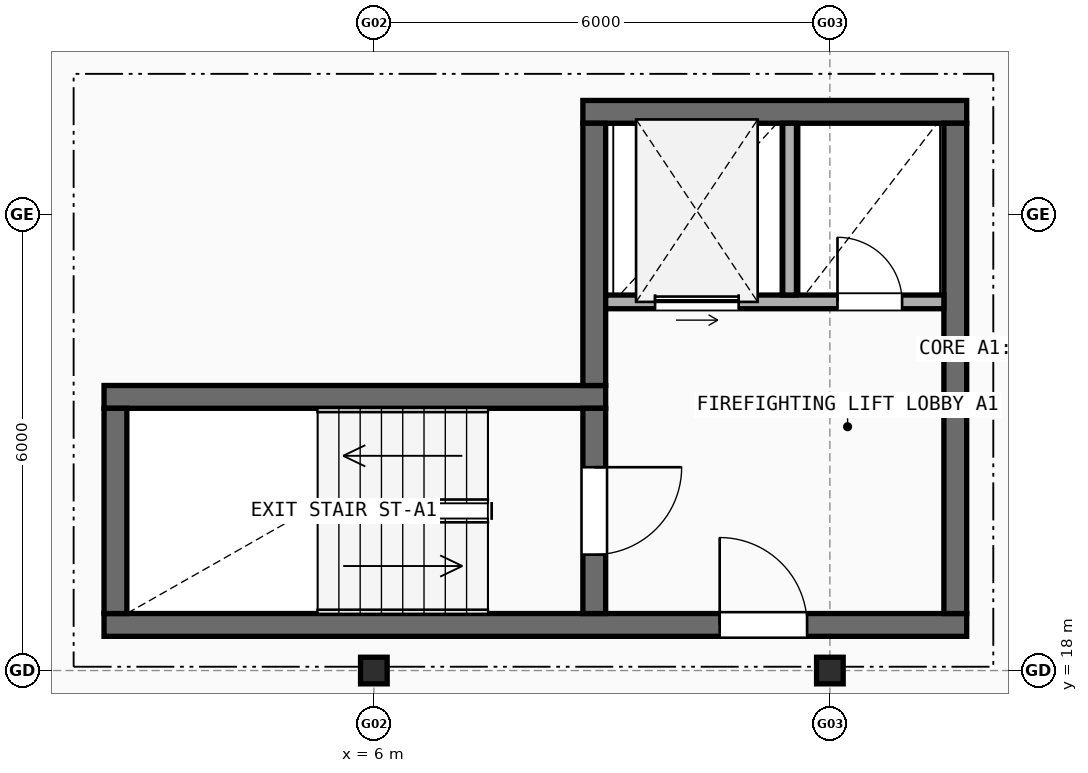
"""IFC4 building model, lengths in metres.
Left out: names, types, materials, properties, quantities, classifications, styles, units other than length and angle.
Written with IfcOpenShell. Run it as: python <this file> out.ifc"""

import sys

from ifc_helpers import new_model, si_unit, direction, frame, frame_2d, origin, origin_2d, place, context, subcontext, project, spatial, rectangle, extrude, element, fill, save


model = new_model("IFC4")
c1 = context("Model", 3, precision=1e-05, world=origin(), true_north=direction((0.0, 1.0)))
c2 = subcontext(c1, "Body", "Model", "MODEL_VIEW")
j1 = project(units=[si_unit("LENGTHUNIT", "METRE"), si_unit("PLANEANGLEUNIT", "RADIAN")], contexts=[c1])
p1 = place(None, origin())
s1 = spatial("IfcSite", under=j1, at=p1, CompositionType="ELEMENT")
p2 = place(p1, origin())
s2 = spatial("IfcBuilding", under=s1, at=p2, CompositionType="ELEMENT")
p3 = place(p2, frame((0.0, 0.0, 42.9)))
s3 = spatial("IfcBuildingStorey", under=s2, at=p3, CompositionType="ELEMENT", Elevation=42.9)
for number, where, z_axis, x_axis in (
    (1, (6.0, 18.0, 0.0), (0.0, 0.0, 1.0), (1.0, 0.0, 0.0)),
    (2, (12.0, 18.0, 0.0), (0.0, 0.0, 1.0), (1.0, 0.0, 0.0)),
):
    element("IfcColumn", number, at=place(p3, frame(where, z_axis=z_axis, x_axis=x_axis)), inside=s3, PredefinedType="COLUMN", context=c2, shape_type="SweptSolid", body=[
        extrude(rectangle(XDim=0.35, YDim=0.35, at=origin_2d()), origin(), (0.0, 0.0, 1.0), 3.005),
    ])
p4 = place(p3, frame((2.45, 18.6, 0.0), z_axis=(0.0, 0.0, 1.0), x_axis=(1.0, 0.0, 0.0)))
e3 = element("IfcWall", 3, at=p4, inside=s3, PredefinedType="SHEAR", context=c2, shape_type="SweptSolid", body=[
    extrude(rectangle(XDim=11.35, YDim=0.3, at=frame_2d((5.675, 0.0))), origin(), (0.0, 0.0, 1.0), 3.005),
])
p5 = place(p4, frame((8.1, 0.0, 0.0)))
e4 = element("IfcOpeningElement", 4, at=p5, cuts=e3, PredefinedType="OPENING", context=c2, shape_type="SweptSolid", body=[
    extrude(rectangle(XDim=1.15, YDim=2.15, at=frame_2d((0.575, 1.075))), frame((0.0, 0.16, 0.0), z_axis=(0.0, -1.0, 0.0), x_axis=(1.0, 0.0, 0.0)), (0.0, 0.0, 1.0), 0.32),
])
p6 = place(p3, frame((9.05, 21.6, 0.0), z_axis=(0.0, 0.0, 1.0), x_axis=(-1.0, 0.0, 0.0)))
e5 = element("IfcWall", 5, at=p6, inside=s3, PredefinedType="SHEAR", context=c2, shape_type="SweptSolid", body=[
    extrude(rectangle(XDim=6.6, YDim=0.3, at=frame_2d((3.3, 0.0))), origin(), (0.0, 0.0, 1.0), 3.005),
])
p7 = place(p3, frame((2.6, 21.45, 0.0), z_axis=(0.0, 0.0, 1.0), x_axis=(0.0, -1.0, 0.0)))
e6 = element("IfcWall", 6, at=p7, inside=s3, PredefinedType="SHEAR", context=c2, shape_type="SweptSolid", body=[
    extrude(rectangle(XDim=2.7, YDim=0.3, at=frame_2d((1.35, 0.0))), origin(), (0.0, 0.0, 1.0), 3.005),
])
p8 = place(p3, frame((8.9, 18.75, 0.0), z_axis=(0.0, 0.0, 1.0), x_axis=(0.0, 1.0, 0.0)))
e7 = element("IfcWall", 7, at=p8, inside=s3, PredefinedType="SHEAR", context=c2, shape_type="SweptSolid", body=[
    extrude(rectangle(XDim=2.7, YDim=0.3, at=frame_2d((1.35, 0.0))), origin(), (0.0, 0.0, 1.0), 3.005),
])
p9 = place(p8, frame((0.775, 0.0, 0.0)))
e8 = element("IfcOpeningElement", 8, at=p9, cuts=e7, PredefinedType="OPENING", context=c2, shape_type="SweptSolid", body=[
    extrude(rectangle(XDim=1.15, YDim=2.15, at=frame_2d((0.575, 1.075))), frame((0.0, 0.16, 0.0), z_axis=(0.0, -1.0, 0.0), x_axis=(1.0, 0.0, 0.0)), (0.0, 0.0, 1.0), 0.32),
])
p10 = place(p3, frame((13.8, 25.35, 0.0), z_axis=(0.0, 0.0, 1.0), x_axis=(-1.0, 0.0, 0.0)))
e9 = element("IfcWall", 9, at=p10, inside=s3, PredefinedType="SHEAR", context=c2, shape_type="SweptSolid", body=[
    extrude(rectangle(XDim=5.05, YDim=0.3, at=frame_2d((2.525, 0.0))), origin(), (0.0, 0.0, 1.0), 3.005),
])
p11 = place(p3, frame((13.65, 18.75, 0.0), z_axis=(0.0, 0.0, 1.0), x_axis=(0.0, 1.0, 0.0)))
e10 = element("IfcWall", 10, at=p11, inside=s3, PredefinedType="SHEAR", context=c2, shape_type="SweptSolid", body=[
    extrude(rectangle(XDim=6.45, YDim=0.3, at=frame_2d((3.225, 0.0))), origin(), (0.0, 0.0, 1.0), 3.005),
])
p12 = place(p3, frame((8.9, 21.75, 0.0), z_axis=(0.0, 0.0, 1.0), x_axis=(0.0, 1.0, 0.0)))
e11 = element("IfcWall", 11, at=p12, inside=s3, PredefinedType="SHEAR", context=c2, shape_type="SweptSolid", body=[
    extrude(rectangle(XDim=3.45, YDim=0.3, at=frame_2d((1.725, 0.0))), origin(), (0.0, 0.0, 1.0), 3.005),
])
p13 = place(p3, frame((9.05, 22.85, 0.0), z_axis=(0.0, 0.0, 1.0), x_axis=(1.0, 0.0, 0.0)))
e12 = element("IfcWall", 12, at=p13, inside=s3, PredefinedType="SOLIDWALL", context=c2, shape_type="SweptSolid", body=[
    extrude(rectangle(XDim=4.45, YDim=0.18, at=frame_2d((2.225, 0.0))), origin(), (0.0, 0.0, 1.0), 3.005),
])
p14 = place(p13, frame((0.65, 0.0, 0.0)))
e13 = element("IfcOpeningElement", 13, at=p14, cuts=e12, PredefinedType="OPENING", context=c2, shape_type="SweptSolid", body=[
    extrude(rectangle(XDim=1.1, YDim=2.15, at=frame_2d((0.55, 1.075))), frame((0.0, 0.1, 0.0), z_axis=(0.0, -1.0, 0.0), x_axis=(1.0, 0.0, 0.0)), (0.0, 0.0, 1.0), 0.2),
])
p15 = place(p13, frame((3.05, 0.0, 0.0)))
e14 = element("IfcOpeningElement", 14, at=p15, cuts=e12, PredefinedType="OPENING", context=c2, shape_type="SweptSolid", body=[
    extrude(rectangle(XDim=0.85, YDim=2.1, at=frame_2d((0.425, 1.05))), frame((0.0, 0.1, 0.0), z_axis=(0.0, -1.0, 0.0), x_axis=(1.0, 0.0, 0.0)), (0.0, 0.0, 1.0), 0.2),
])
p16 = place(p3, frame((11.47, 22.94, 0.0), z_axis=(0.0, 0.0, 1.0), x_axis=(0.0, 1.0, 0.0)))
e15 = element("IfcWall", 15, at=p16, inside=s3, PredefinedType="SOLIDWALL", context=c2, shape_type="SweptSolid", body=[
    extrude(rectangle(XDim=2.26, YDim=0.18, at=frame_2d((1.13, 0.0))), origin(), (0.0, 0.0, 1.0), 3.005),
])
p17 = place(p5, origin())
e16 = element("IfcDoor", 16, at=p17, inside=s3, OperationType="SINGLE_SWING_LEFT", PredefinedType="DOOR", context=c2, shape_type="SweptSolid", body=[
    extrude(rectangle(XDim=1.15, YDim=2.15, at=frame_2d((0.575, 1.075))), frame((0.0, 0.025, 0.0), z_axis=(0.0, -1.0, 0.0), x_axis=(1.0, 0.0, 0.0)), (0.0, 0.0, 1.0), 0.05),
])
fill(e4, e16)
p18 = place(p9, origin())
e17 = element("IfcDoor", 17, at=p18, inside=s3, OperationType="SINGLE_SWING_RIGHT", PredefinedType="DOOR", context=c2, shape_type="SweptSolid", body=[
    extrude(rectangle(XDim=1.15, YDim=2.15, at=frame_2d((0.575, 1.075))), frame((0.0, 0.025, 0.0), z_axis=(0.0, -1.0, 0.0), x_axis=(1.0, 0.0, 0.0)), (0.0, 0.0, 1.0), 0.05),
])
fill(e8, e17)
p19 = place(p14, origin())
e18 = element("IfcDoor", 18, at=p19, inside=s3, OperationType="SLIDING_TO_LEFT", PredefinedType="DOOR", context=c2, shape_type="SweptSolid", body=[
    extrude(rectangle(XDim=1.1, YDim=2.15, at=frame_2d((0.55, 1.075))), frame((0.0, 0.025, 0.0), z_axis=(0.0, -1.0, 0.0), x_axis=(1.0, 0.0, 0.0)), (0.0, 0.0, 1.0), 0.05),
])
fill(e13, e18)
p20 = place(p15, frame((0.85, 0.0, 0.0), z_axis=(0.0, 0.0, 1.0), x_axis=(-1.0, 0.0, 0.0)))
e19 = element("IfcDoor", 19, at=p20, inside=s3, OperationType="SINGLE_SWING_LEFT", PredefinedType="DOOR", context=c2, shape_type="SweptSolid", body=[
    extrude(rectangle(XDim=0.85, YDim=2.1, at=frame_2d((0.425, 1.05))), frame((0.0, 0.025, 0.0), z_axis=(0.0, -1.0, 0.0), x_axis=(1.0, 0.0, 0.0)), (0.0, 0.0, 1.0), 0.05),
])
fill(e14, e19)
save(model, sys.argv[1])
